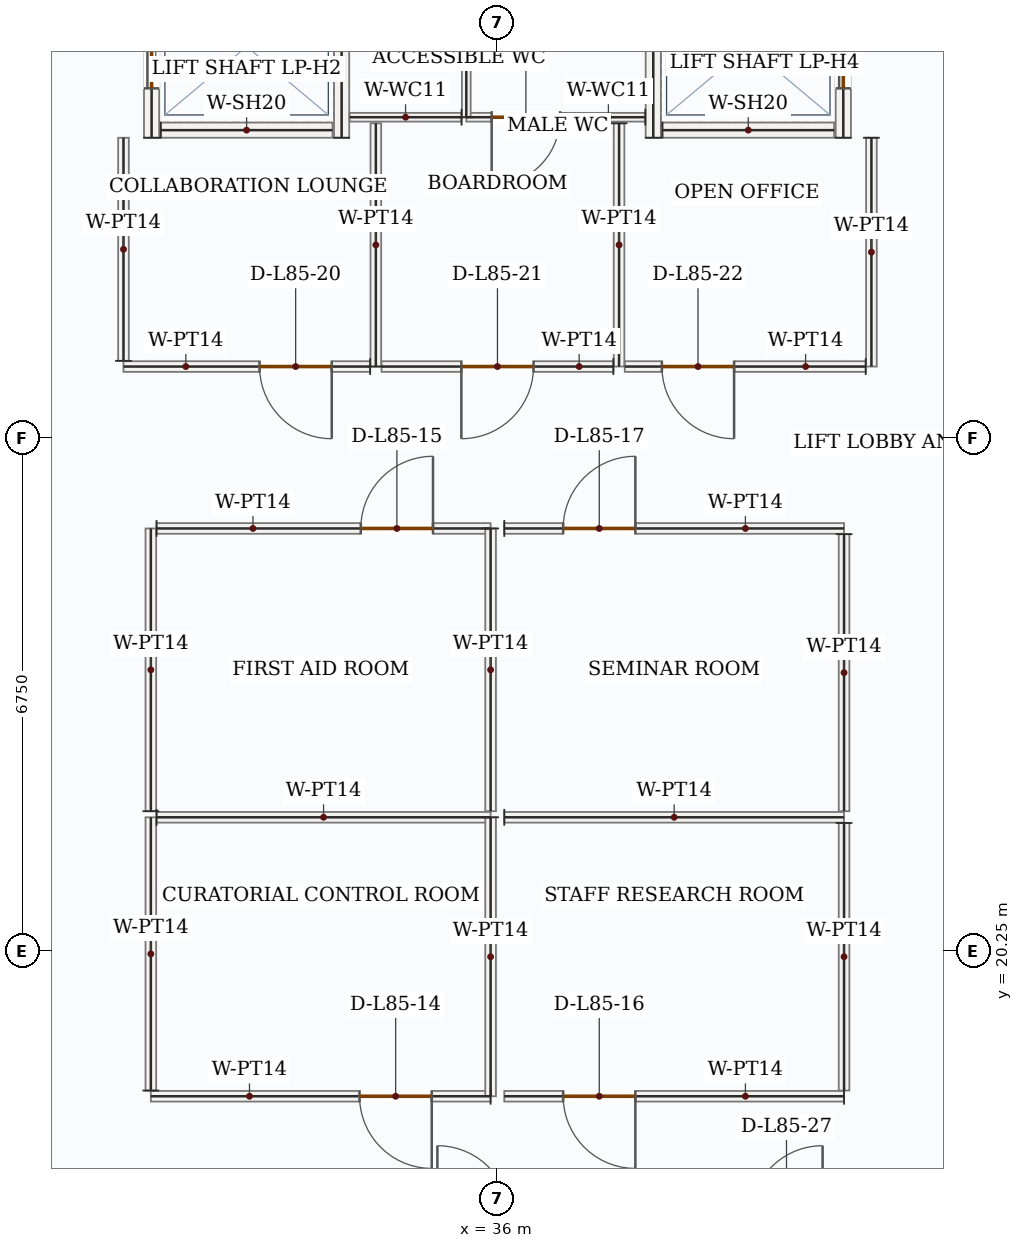
"""IFC4 building model, lengths in metres.
Left out: names, types, materials, properties, quantities, classifications, styles, units other than length and angle.
Written with IfcOpenShell. Run it as: python <this file> out.ifc"""

import sys

from ifc_helpers import new_model, si_unit, direction, frame, frame_2d, origin, place, context, subcontext, project, spatial, rectangle, extrude, source, transform, mapped, element, fill, save


model = new_model("IFC4")
c1 = context("Model", 3, precision=1e-05, world=origin(), true_north=direction((0.0, 1.0)))
c2 = subcontext(c1, "Body", "Model", "MODEL_VIEW")
j1 = project(units=[si_unit("LENGTHUNIT", "METRE"), si_unit("PLANEANGLEUNIT", "RADIAN")], contexts=[c1])
p1 = place(None, origin())
s1 = spatial("IfcSite", under=j1, at=p1, CompositionType="ELEMENT")
p2 = place(p1, origin())
s2 = spatial("IfcBuilding", under=s1, at=p2, CompositionType="ELEMENT")
p3 = place(p2, frame((0.0, 0.0, 349.8)))
s3 = spatial("IfcBuildingStorey", under=s2, at=p3, CompositionType="ELEMENT", Elevation=349.8)
p4 = place(p3, frame((31.45, 30.95, 0.0), z_axis=(0.0, 0.0, 1.0), x_axis=(0.0, 1.0, 0.0)))
e1 = element("IfcWall", 1, at=p4, inside=s3, PredefinedType="SOLIDWALL", context=c2, shape_type="SweptSolid", body=[
    extrude(rectangle(XDim=2.4, YDim=0.2, at=frame_2d((1.2, 0.0))), origin(), (0.0, 0.0, 1.0), 3.5),
])
p5 = place(p4, frame((0.65, 0.0, 0.0)))
e2 = element("IfcOpeningElement", 2, at=p5, cuts=e1, PredefinedType="OPENING", context=c2, shape_type="SweptSolid", body=[
    extrude(rectangle(XDim=1.1, YDim=2.15, at=frame_2d((0.55, 1.075))), frame((0.0, 0.11, 0.0), z_axis=(0.0, -1.0, 0.0), x_axis=(1.0, 0.0, 0.0)), (0.0, 0.0, 1.0), 0.22),
])
m1 = source(origin(), c2, "Body", "SweptSolid", [
    extrude(rectangle(XDim=2.4, YDim=0.2, at=frame_2d((1.2, 0.0))), origin(), (0.0, 0.0, 1.0), 3.5),
])
p6 = place(p3, frame((33.95, 30.95, 0.0), z_axis=(0.0, 0.0, 1.0), x_axis=(0.0, 1.0, 0.0)))
e3 = element("IfcWall", 3, at=p6, inside=s3, PredefinedType="SOLIDWALL", context=c2, shape_type="MappedRepresentation", body=[
    mapped(m1, transform((0.0, 0.0, 0.0), x_axis=(1.0, 0.0, 0.0), y_axis=(0.0, 1.0, 0.0), z_axis=(0.0, 0.0, 1.0), scale=1.0)),
])
m2 = source(origin(), c2, "Body", "SweptSolid", [
    extrude(rectangle(XDim=2.26, YDim=0.2, at=frame_2d((1.13, 0.0))), origin(), (0.0, 0.0, 1.0), 3.5),
])
p7 = place(p3, frame((31.57, 31.05, 0.0), z_axis=(0.0, 0.0, 1.0), x_axis=(1.0, 0.0, 0.0)))
e4 = element("IfcWall", 4, at=p7, inside=s3, PredefinedType="SOLIDWALL", context=c2, shape_type="MappedRepresentation", body=[
    mapped(m2, transform((0.0, 0.0, 0.0), x_axis=(1.0, 0.0, 0.0), y_axis=(0.0, 1.0, 0.0), z_axis=(0.0, 0.0, 1.0), scale=1.0)),
])
p8 = place(p3, frame((38.05, 30.95, 0.0), z_axis=(0.0, 0.0, 1.0), x_axis=(0.0, 1.0, 0.0)))
e5 = element("IfcWall", 5, at=p8, inside=s3, PredefinedType="SOLIDWALL", context=c2, shape_type="MappedRepresentation", body=[
    mapped(m1, transform((0.0, 0.0, 0.0), x_axis=(1.0, 0.0, 0.0), y_axis=(0.0, 1.0, 0.0), z_axis=(0.0, 0.0, 1.0), scale=1.0)),
])
p9 = place(p3, frame((40.55, 30.95, 0.0), z_axis=(0.0, 0.0, 1.0), x_axis=(0.0, 1.0, 0.0)))
e6 = element("IfcWall", 6, at=p9, inside=s3, PredefinedType="SOLIDWALL", context=c2, shape_type="SweptSolid", body=[
    extrude(rectangle(XDim=2.4, YDim=0.2, at=frame_2d((1.2, 0.0))), origin(), (0.0, 0.0, 1.0), 3.5),
])
p10 = place(p9, frame((0.65, 0.0, 0.0)))
e7 = element("IfcOpeningElement", 7, at=p10, cuts=e6, PredefinedType="OPENING", context=c2, shape_type="SweptSolid", body=[
    extrude(rectangle(XDim=1.1, YDim=2.15, at=frame_2d((0.55, 1.075))), frame((0.0, 0.11, 0.0), z_axis=(0.0, -1.0, 0.0), x_axis=(1.0, 0.0, 0.0)), (0.0, 0.0, 1.0), 0.22),
])
p11 = place(p3, frame((38.17, 31.05, 0.0), z_axis=(0.0, 0.0, 1.0), x_axis=(1.0, 0.0, 0.0)))
e8 = element("IfcWall", 8, at=p11, inside=s3, PredefinedType="SOLIDWALL", context=c2, shape_type="MappedRepresentation", body=[
    mapped(m2, transform((0.0, 0.0, 0.0), x_axis=(1.0, 0.0, 0.0), y_axis=(0.0, 1.0, 0.0), z_axis=(0.0, 0.0, 1.0), scale=1.0)),
])
p12 = place(p3, frame((37.945, 31.22, 0.0), z_axis=(0.0, 0.0, 1.0), x_axis=(-1.0, 0.0, 0.0)))
e9 = element("IfcWall", 9, at=p12, inside=s3, PredefinedType="PARTITIONING", context=c2, shape_type="SweptSolid", body=[
    extrude(rectangle(XDim=2.355, YDim=0.115, at=frame_2d((1.177, 0.0))), origin(), (0.0, 0.0, 1.0), 3.5),
])
p13 = place(p12, frame((1.121, 0.0, 0.0)))
e10 = element("IfcOpeningElement", 10, at=p13, cuts=e9, PredefinedType="OPENING", context=c2, shape_type="SweptSolid", body=[
    extrude(rectangle(XDim=0.9, YDim=2.1, at=frame_2d((0.45, 1.05))), frame((0.0, 0.067, 0.0), z_axis=(0.0, -1.0, 0.0), x_axis=(1.0, 0.0, 0.0)), (0.0, 0.0, 1.0), 0.135),
])
m3 = source(origin(), c2, "Body", "SweptSolid", [
    extrude(rectangle(XDim=1.96, YDim=0.115, at=frame_2d((0.98, 0.0))), origin(), (0.0, 0.0, 1.0), 3.5),
])
p14 = place(p3, frame((35.59, 31.22, 0.0), z_axis=(0.0, 0.0, 1.0), x_axis=(0.0, 1.0, 0.0)))
e11 = element("IfcWall", 11, at=p14, inside=s3, PredefinedType="PARTITIONING", context=c2, shape_type="MappedRepresentation", body=[
    mapped(m3, transform((0.0, 0.0, 0.0), x_axis=(1.0, 0.0, 0.0), y_axis=(0.0, 1.0, 0.0), z_axis=(0.0, 0.0, 1.0), scale=1.0)),
])
m4 = source(origin(), c2, "Body", "SweptSolid", [
    extrude(rectangle(XDim=1.473, YDim=0.115, at=frame_2d((0.736, 0.0))), origin(), (0.0, 0.0, 1.0), 3.5),
])
p15 = place(p3, frame((35.528, 31.22, 0.0), z_axis=(0.0, 0.0, 1.0), x_axis=(-1.0, 0.0, 0.0)))
e12 = element("IfcWall", 12, at=p15, inside=s3, PredefinedType="PARTITIONING", context=c2, shape_type="MappedRepresentation", body=[
    mapped(m4, transform((0.0, 0.0, 0.0), x_axis=(1.0, 0.0, 0.0), y_axis=(0.0, 1.0, 0.0), z_axis=(0.0, 0.0, 1.0), scale=1.0)),
])
m5 = source(origin(), c2, "Body", "SweptSolid", [
    extrude(rectangle(XDim=3.2, YDim=0.14, at=frame_2d((1.6, 0.0))), origin(), (0.0, 0.0, 1.0), 3.5),
])
for number, where, z_axis, x_axis in (
    (13, (34.4, 27.94, 0.0), (0.0, 0.0, 1.0), (0.0, 1.0, 0.0)),
    (14, (37.6, 31.14, 0.0), (0.0, 0.0, 1.0), (0.0, -1.0, 0.0)),
):
    element("IfcWall", number, at=place(p3, frame(where, z_axis=z_axis, x_axis=x_axis)), inside=s3, PredefinedType="PARTITIONING", context=c2, shape_type="MappedRepresentation", body=[
        mapped(m5, transform((0.0, 0.0, 0.0), x_axis=(1.0, 0.0, 0.0), y_axis=(0.0, 1.0, 0.0), z_axis=(0.0, 0.0, 1.0), scale=1.0)),
    ])
p16 = place(p3, frame((37.525, 27.94, 0.0), z_axis=(0.0, 0.0, 1.0), x_axis=(-1.0, 0.0, 0.0)))
e15 = element("IfcWall", 15, at=p16, inside=s3, PredefinedType="PARTITIONING", context=c2, shape_type="SweptSolid", body=[
    extrude(rectangle(XDim=3.05, YDim=0.14, at=frame_2d((1.525, 0.0))), origin(), (0.0, 0.0, 1.0), 3.5),
])
p17 = place(p16, frame((1.05, 0.0, 0.0)))
e16 = element("IfcOpeningElement", 16, at=p17, cuts=e15, PredefinedType="OPENING", context=c2, shape_type="SweptSolid", body=[
    extrude(rectangle(XDim=0.95, YDim=2.15, at=frame_2d((0.475, 1.075))), frame((0.0, 0.08, 0.0), z_axis=(0.0, -1.0, 0.0), x_axis=(1.0, 0.0, 0.0)), (0.0, 0.0, 1.0), 0.16),
])
p18 = place(p3, frame((34.325, 27.94, 0.0), z_axis=(0.0, 0.0, 1.0), x_axis=(-1.0, 0.0, 0.0)))
e17 = element("IfcWall", 17, at=p18, inside=s3, PredefinedType="PARTITIONING", context=c2, shape_type="SweptSolid", body=[
    extrude(rectangle(XDim=3.245, YDim=0.14, at=frame_2d((1.623, 0.0))), origin(), (0.0, 0.0, 1.0), 3.5),
])
p19 = place(p18, frame((0.505, 0.0, 0.0)))
e18 = element("IfcOpeningElement", 18, at=p19, cuts=e17, PredefinedType="OPENING", context=c2, shape_type="SweptSolid", body=[
    extrude(rectangle(XDim=0.95, YDim=2.15, at=frame_2d((0.475, 1.075))), frame((0.0, 0.08, 0.0), z_axis=(0.0, -1.0, 0.0), x_axis=(1.0, 0.0, 0.0)), (0.0, 0.0, 1.0), 0.16),
])
m6 = source(origin(), c2, "Body", "SweptSolid", [
    extrude(rectangle(XDim=2.935, YDim=0.14, at=frame_2d((1.468, 0.0))), origin(), (0.0, 0.0, 1.0), 3.5),
])
p20 = place(p3, frame((31.08, 28.015, 0.0), z_axis=(0.0, 0.0, 1.0), x_axis=(0.0, 1.0, 0.0)))
e19 = element("IfcWall", 19, at=p20, inside=s3, PredefinedType="PARTITIONING", context=c2, shape_type="MappedRepresentation", body=[
    mapped(m6, transform((0.0, 0.0, 0.0), x_axis=(1.0, 0.0, 0.0), y_axis=(0.0, 1.0, 0.0), z_axis=(0.0, 0.0, 1.0), scale=1.0)),
])
m7 = source(origin(), c2, "Body", "SweptSolid", [
    extrude(rectangle(XDim=3.01, YDim=0.14, at=frame_2d((1.505, 0.0))), origin(), (0.0, 0.0, 1.0), 3.5),
])
p21 = place(p3, frame((40.92, 30.95, 0.0), z_axis=(0.0, 0.0, 1.0), x_axis=(0.0, -1.0, 0.0)))
e20 = element("IfcWall", 20, at=p21, inside=s3, PredefinedType="PARTITIONING", context=c2, shape_type="MappedRepresentation", body=[
    mapped(m7, transform((0.0, 0.0, 0.0), x_axis=(1.0, 0.0, 0.0), y_axis=(0.0, 1.0, 0.0), z_axis=(0.0, 0.0, 1.0), scale=1.0)),
])
p22 = place(p3, frame((40.845, 27.94, 0.0), z_axis=(0.0, 0.0, 1.0), x_axis=(-1.0, 0.0, 0.0)))
e21 = element("IfcWall", 21, at=p22, inside=s3, PredefinedType="PARTITIONING", context=c2, shape_type="SweptSolid", body=[
    extrude(rectangle(XDim=3.17, YDim=0.14, at=frame_2d((1.585, 0.0))), origin(), (0.0, 0.0, 1.0), 3.5),
])
p23 = place(p22, frame((1.732, 0.0, 0.0)))
e22 = element("IfcOpeningElement", 22, at=p23, cuts=e21, PredefinedType="OPENING", context=c2, shape_type="SweptSolid", body=[
    extrude(rectangle(XDim=0.95, YDim=2.15, at=frame_2d((0.475, 1.075))), frame((0.0, 0.08, 0.0), z_axis=(0.0, -1.0, 0.0), x_axis=(1.0, 0.0, 0.0)), (0.0, 0.0, 1.0), 0.16),
])
p24 = place(p3, frame((35.91, 18.34, 0.0), z_axis=(0.0, 0.0, 1.0), x_axis=(-1.0, 0.0, 0.0)))
e23 = element("IfcWall", 23, at=p24, inside=s3, PredefinedType="PARTITIONING", context=c2, shape_type="SweptSolid", body=[
    extrude(rectangle(XDim=4.47, YDim=0.14, at=frame_2d((2.235, 0.0))), origin(), (0.0, 0.0, 1.0), 3.5),
])
p25 = place(p24, frame((0.774, 0.0, 0.0)))
e24 = element("IfcOpeningElement", 24, at=p25, cuts=e23, PredefinedType="OPENING", context=c2, shape_type="SweptSolid", body=[
    extrude(rectangle(XDim=0.95, YDim=2.15, at=frame_2d((0.475, 1.075))), frame((0.0, 0.08, 0.0), z_axis=(0.0, -1.0, 0.0), x_axis=(1.0, 0.0, 0.0)), (0.0, 0.0, 1.0), 0.16),
])
m8 = source(origin(), c2, "Body", "SweptSolid", [
    extrude(rectangle(XDim=3.595, YDim=0.14, at=frame_2d((1.797, 0.0))), origin(), (0.0, 0.0, 1.0), 3.5),
])
p26 = place(p3, frame((31.44, 18.415, 0.0), z_axis=(0.0, 0.0, 1.0), x_axis=(0.0, 1.0, 0.0)))
e25 = element("IfcWall", 25, at=p26, inside=s3, PredefinedType="PARTITIONING", context=c2, shape_type="MappedRepresentation", body=[
    mapped(m8, transform((0.0, 0.0, 0.0), x_axis=(1.0, 0.0, 0.0), y_axis=(0.0, 1.0, 0.0), z_axis=(0.0, 0.0, 1.0), scale=1.0)),
])
m9 = source(origin(), c2, "Body", "SweptSolid", [
    extrude(rectangle(XDim=4.395, YDim=0.14, at=frame_2d((2.198, 0.0))), origin(), (0.0, 0.0, 1.0), 3.5),
])
p27 = place(p3, frame((31.515, 22.01, 0.0), z_axis=(0.0, 0.0, 1.0), x_axis=(1.0, 0.0, 0.0)))
e26 = element("IfcWall", 26, at=p27, inside=s3, PredefinedType="PARTITIONING", context=c2, shape_type="MappedRepresentation", body=[
    mapped(m9, transform((0.0, 0.0, 0.0), x_axis=(1.0, 0.0, 0.0), y_axis=(0.0, 1.0, 0.0), z_axis=(0.0, 0.0, 1.0), scale=1.0)),
])
m10 = source(origin(), c2, "Body", "SweptSolid", [
    extrude(rectangle(XDim=3.67, YDim=0.14, at=frame_2d((1.835, 0.0))), origin(), (0.0, 0.0, 1.0), 3.5),
])
p28 = place(p3, frame((35.91, 22.01, 0.0), z_axis=(0.0, 0.0, 1.0), x_axis=(0.0, -1.0, 0.0)))
e27 = element("IfcWall", 27, at=p28, inside=s3, PredefinedType="PARTITIONING", context=c2, shape_type="MappedRepresentation", body=[
    mapped(m10, transform((0.0, 0.0, 0.0), x_axis=(1.0, 0.0, 0.0), y_axis=(0.0, 1.0, 0.0), z_axis=(0.0, 0.0, 1.0), scale=1.0)),
])
p29 = place(p3, frame((40.56, 18.34, 0.0), z_axis=(0.0, 0.0, 1.0), x_axis=(-1.0, 0.0, 0.0)))
e28 = element("IfcWall", 28, at=p29, inside=s3, PredefinedType="PARTITIONING", context=c2, shape_type="SweptSolid", body=[
    extrude(rectangle(XDim=4.47, YDim=0.14, at=frame_2d((2.235, 0.0))), origin(), (0.0, 0.0, 1.0), 3.5),
])
p30 = place(p29, frame((2.746, 0.0, 0.0)))
e29 = element("IfcOpeningElement", 29, at=p30, cuts=e28, PredefinedType="OPENING", context=c2, shape_type="SweptSolid", body=[
    extrude(rectangle(XDim=0.95, YDim=2.15, at=frame_2d((0.475, 1.075))), frame((0.0, 0.08, 0.0), z_axis=(0.0, -1.0, 0.0), x_axis=(1.0, 0.0, 0.0)), (0.0, 0.0, 1.0), 0.16),
])
m11 = source(origin(), c2, "Body", "SweptSolid", [
    extrude(rectangle(XDim=4.47, YDim=0.14, at=frame_2d((2.235, 0.0))), origin(), (0.0, 0.0, 1.0), 3.5),
])
p31 = place(p3, frame((36.09, 22.01, 0.0), z_axis=(0.0, 0.0, 1.0), x_axis=(1.0, 0.0, 0.0)))
e30 = element("IfcWall", 30, at=p31, inside=s3, PredefinedType="PARTITIONING", context=c2, shape_type="MappedRepresentation", body=[
    mapped(m11, transform((0.0, 0.0, 0.0), x_axis=(1.0, 0.0, 0.0), y_axis=(0.0, 1.0, 0.0), z_axis=(0.0, 0.0, 1.0), scale=1.0)),
])
m12 = source(origin(), c2, "Body", "SweptSolid", [
    extrude(rectangle(XDim=3.52, YDim=0.14, at=frame_2d((1.76, 0.0))), origin(), (0.0, 0.0, 1.0), 3.5),
])
p32 = place(p3, frame((40.56, 21.935, 0.0), z_axis=(0.0, 0.0, 1.0), x_axis=(0.0, -1.0, 0.0)))
e31 = element("IfcWall", 31, at=p32, inside=s3, PredefinedType="PARTITIONING", context=c2, shape_type="MappedRepresentation", body=[
    mapped(m12, transform((0.0, 0.0, 0.0), x_axis=(1.0, 0.0, 0.0), y_axis=(0.0, 1.0, 0.0), z_axis=(0.0, 0.0, 1.0), scale=1.0)),
])
m13 = source(origin(), c2, "Body", "SweptSolid", [
    extrude(rectangle(XDim=3.72, YDim=0.14, at=frame_2d((1.86, 0.0))), origin(), (0.0, 0.0, 1.0), 3.5),
])
p33 = place(p3, frame((31.44, 22.09, 0.0), z_axis=(0.0, 0.0, 1.0), x_axis=(0.0, 1.0, 0.0)))
e32 = element("IfcWall", 32, at=p33, inside=s3, PredefinedType="PARTITIONING", context=c2, shape_type="MappedRepresentation", body=[
    mapped(m13, transform((0.0, 0.0, 0.0), x_axis=(1.0, 0.0, 0.0), y_axis=(0.0, 1.0, 0.0), z_axis=(0.0, 0.0, 1.0), scale=1.0)),
])
p34 = place(p3, frame((31.515, 25.81, 0.0), z_axis=(0.0, 0.0, 1.0), x_axis=(1.0, 0.0, 0.0)))
e33 = element("IfcWall", 33, at=p34, inside=s3, PredefinedType="PARTITIONING", context=c2, shape_type="SweptSolid", body=[
    extrude(rectangle(XDim=4.395, YDim=0.14, at=frame_2d((2.198, 0.0))), origin(), (0.0, 0.0, 1.0), 3.5),
])
p35 = place(p34, frame((2.687, 0.0, 0.0)))
e34 = element("IfcOpeningElement", 34, at=p35, cuts=e33, PredefinedType="OPENING", context=c2, shape_type="SweptSolid", body=[
    extrude(rectangle(XDim=0.95, YDim=2.15, at=frame_2d((0.475, 1.075))), frame((0.0, 0.08, 0.0), z_axis=(0.0, -1.0, 0.0), x_axis=(1.0, 0.0, 0.0)), (0.0, 0.0, 1.0), 0.16),
])
p36 = place(p3, frame((35.91, 25.81, 0.0), z_axis=(0.0, 0.0, 1.0), x_axis=(0.0, -1.0, 0.0)))
e35 = element("IfcWall", 35, at=p36, inside=s3, PredefinedType="PARTITIONING", context=c2, shape_type="MappedRepresentation", body=[
    mapped(m13, transform((0.0, 0.0, 0.0), x_axis=(1.0, 0.0, 0.0), y_axis=(0.0, 1.0, 0.0), z_axis=(0.0, 0.0, 1.0), scale=1.0)),
])
p37 = place(p3, frame((36.09, 25.81, 0.0), z_axis=(0.0, 0.0, 1.0), x_axis=(1.0, 0.0, 0.0)))
e36 = element("IfcWall", 36, at=p37, inside=s3, PredefinedType="PARTITIONING", context=c2, shape_type="SweptSolid", body=[
    extrude(rectangle(XDim=4.47, YDim=0.14, at=frame_2d((2.235, 0.0))), origin(), (0.0, 0.0, 1.0), 3.5),
])
p38 = place(p37, frame((0.774, 0.0, 0.0)))
e37 = element("IfcOpeningElement", 37, at=p38, cuts=e36, PredefinedType="OPENING", context=c2, shape_type="SweptSolid", body=[
    extrude(rectangle(XDim=0.95, YDim=2.15, at=frame_2d((0.475, 1.075))), frame((0.0, 0.08, 0.0), z_axis=(0.0, -1.0, 0.0), x_axis=(1.0, 0.0, 0.0)), (0.0, 0.0, 1.0), 0.16),
])
m14 = source(origin(), c2, "Body", "SweptSolid", [
    extrude(rectangle(XDim=3.645, YDim=0.14, at=frame_2d((1.823, 0.0))), origin(), (0.0, 0.0, 1.0), 3.5),
])
p39 = place(p3, frame((40.56, 25.735, 0.0), z_axis=(0.0, 0.0, 1.0), x_axis=(0.0, -1.0, 0.0)))
e38 = element("IfcWall", 38, at=p39, inside=s3, PredefinedType="PARTITIONING", context=c2, shape_type="MappedRepresentation", body=[
    mapped(m14, transform((0.0, 0.0, 0.0), x_axis=(1.0, 0.0, 0.0), y_axis=(0.0, 1.0, 0.0), z_axis=(0.0, 0.0, 1.0), scale=1.0)),
])
m15 = source(origin(), c2, "Body", "SweptSolid", [
    extrude(rectangle(XDim=1.1, YDim=2.15, at=frame_2d((0.55, 1.075))), frame((0.0, 0.025, 0.0), z_axis=(0.0, -1.0, 0.0), x_axis=(1.0, 0.0, 0.0)), (0.0, 0.0, 1.0), 0.05),
])
p40 = place(p5, origin())
e39 = element("IfcDoor", 39, at=p40, inside=s3, OperationType="DOUBLE_DOOR_SLIDING", PredefinedType="DOOR", context=c2, shape_type="MappedRepresentation", body=[
    mapped(m15, transform((0.0, 0.0, 0.0), x_axis=(1.0, 0.0, 0.0), y_axis=(0.0, 1.0, 0.0), z_axis=(0.0, 0.0, 1.0), scale=1.0)),
])
fill(e2, e39)
p41 = place(p10, origin())
e40 = element("IfcDoor", 40, at=p41, inside=s3, OperationType="DOUBLE_DOOR_SLIDING", PredefinedType="DOOR", context=c2, shape_type="MappedRepresentation", body=[
    mapped(m15, transform((0.0, 0.0, 0.0), x_axis=(1.0, 0.0, 0.0), y_axis=(0.0, 1.0, 0.0), z_axis=(0.0, 0.0, 1.0), scale=1.0)),
])
fill(e7, e40)
m16 = source(origin(), c2, "Body", "SweptSolid", [
    extrude(rectangle(XDim=0.95, YDim=2.15, at=frame_2d((0.475, 1.075))), frame((0.0, 0.025, 0.0), z_axis=(0.0, -1.0, 0.0), x_axis=(1.0, 0.0, 0.0)), (0.0, 0.0, 1.0), 0.05),
])
p42 = place(p25, origin())
e41 = element("IfcDoor", 41, at=p42, inside=s3, OperationType="SINGLE_SWING_LEFT", PredefinedType="DOOR", context=c2, shape_type="MappedRepresentation", body=[
    mapped(m16, transform((0.0, 0.0, 0.0), x_axis=(1.0, 0.0, 0.0), y_axis=(0.0, 1.0, 0.0), z_axis=(0.0, 0.0, 1.0), scale=1.0)),
])
fill(e24, e41)
p43 = place(p35, origin())
e42 = element("IfcDoor", 42, at=p43, inside=s3, OperationType="SINGLE_SWING_RIGHT", PredefinedType="DOOR", context=c2, shape_type="MappedRepresentation", body=[
    mapped(m16, transform((0.0, 0.0, 0.0), x_axis=(1.0, 0.0, 0.0), y_axis=(0.0, 1.0, 0.0), z_axis=(0.0, 0.0, 1.0), scale=1.0)),
])
fill(e34, e42)
p44 = place(p30, origin())
e43 = element("IfcDoor", 43, at=p44, inside=s3, OperationType="SINGLE_SWING_LEFT", PredefinedType="DOOR", context=c2, shape_type="MappedRepresentation", body=[
    mapped(m16, transform((0.0, 0.0, 0.0), x_axis=(1.0, 0.0, 0.0), y_axis=(0.0, 1.0, 0.0), z_axis=(0.0, 0.0, 1.0), scale=1.0)),
])
fill(e29, e43)
p45 = place(p38, origin())
e44 = element("IfcDoor", 44, at=p45, inside=s3, OperationType="SINGLE_SWING_RIGHT", PredefinedType="DOOR", context=c2, shape_type="MappedRepresentation", body=[
    mapped(m16, transform((0.0, 0.0, 0.0), x_axis=(1.0, 0.0, 0.0), y_axis=(0.0, 1.0, 0.0), z_axis=(0.0, 0.0, 1.0), scale=1.0)),
])
fill(e37, e44)
p46 = place(p19, origin())
e45 = element("IfcDoor", 45, at=p46, inside=s3, OperationType="SINGLE_SWING_LEFT", PredefinedType="DOOR", context=c2, shape_type="MappedRepresentation", body=[
    mapped(m16, transform((0.0, 0.0, 0.0), x_axis=(1.0, 0.0, 0.0), y_axis=(0.0, 1.0, 0.0), z_axis=(0.0, 0.0, 1.0), scale=1.0)),
])
fill(e18, e45)
p47 = place(p17, origin())
e46 = element("IfcDoor", 46, at=p47, inside=s3, OperationType="SINGLE_SWING_RIGHT", PredefinedType="DOOR", context=c2, shape_type="MappedRepresentation", body=[
    mapped(m16, transform((0.0, 0.0, 0.0), x_axis=(1.0, 0.0, 0.0), y_axis=(0.0, 1.0, 0.0), z_axis=(0.0, 0.0, 1.0), scale=1.0)),
])
fill(e16, e46)
p48 = place(p23, origin())
e47 = element("IfcDoor", 47, at=p48, inside=s3, OperationType="SINGLE_SWING_LEFT", PredefinedType="DOOR", context=c2, shape_type="MappedRepresentation", body=[
    mapped(m16, transform((0.0, 0.0, 0.0), x_axis=(1.0, 0.0, 0.0), y_axis=(0.0, 1.0, 0.0), z_axis=(0.0, 0.0, 1.0), scale=1.0)),
])
fill(e22, e47)
m17 = source(origin(), c2, "Body", "SweptSolid", [
    extrude(rectangle(XDim=0.9, YDim=2.1, at=frame_2d((0.45, 1.05))), frame((0.0, 0.025, 0.0), z_axis=(0.0, -1.0, 0.0), x_axis=(1.0, 0.0, 0.0)), (0.0, 0.0, 1.0), 0.05),
])
p49 = place(p13, origin())
e48 = element("IfcDoor", 48, at=p49, inside=s3, OperationType="SINGLE_SWING_RIGHT", PredefinedType="DOOR", context=c2, shape_type="MappedRepresentation", body=[
    mapped(m17, transform((0.0, 0.0, 0.0), x_axis=(1.0, 0.0, 0.0), y_axis=(0.0, 1.0, 0.0), z_axis=(0.0, 0.0, 1.0), scale=1.0)),
])
fill(e10, e48)
save(model, sys.argv[1])
